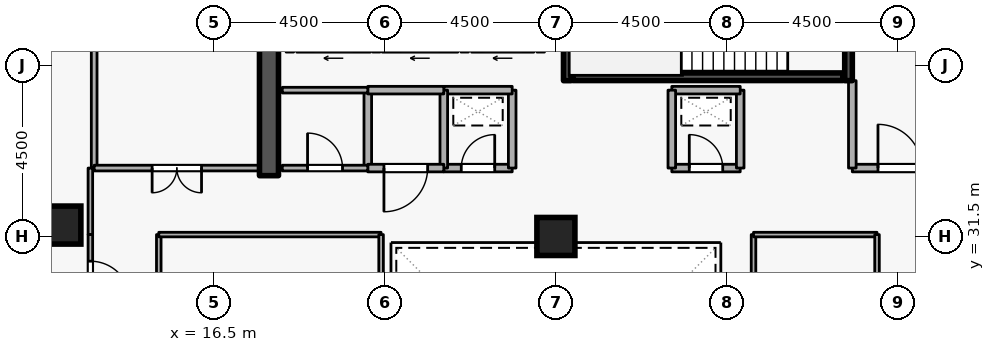
"""IFC4 building model, lengths in metres.
Left out: names, types, materials, properties, quantities, classifications, styles, units other than length and angle.
Written with IfcOpenShell. Run it as: python <this file> out.ifc"""

import sys

from ifc_helpers import new_model, si_unit, direction, frame, frame_2d, origin, origin_2d, place, context, subcontext, project, spatial, rectangle, extrude, element, fill, save


model = new_model("IFC4")
c1 = context("Model", 3, precision=1e-05, world=origin(), true_north=direction((0.0, 1.0)))
c2 = subcontext(c1, "Body", "Model", "MODEL_VIEW")
j1 = project(units=[si_unit("LENGTHUNIT", "METRE"), si_unit("PLANEANGLEUNIT", "RADIAN")], contexts=[c1])
p1 = place(None, origin())
s1 = spatial("IfcSite", under=j1, at=p1, CompositionType="ELEMENT")
p2 = place(p1, origin())
s2 = spatial("IfcBuilding", under=s1, at=p2, CompositionType="ELEMENT")
p3 = place(p2, frame((0.0, 0.0, 229.5)))
s3 = spatial("IfcBuildingStorey", under=s2, at=p3, CompositionType="ELEMENT", Elevation=229.5)
p4 = place(p3, frame((17.95, 33.1, 0.0), z_axis=(0.0, 0.0, 1.0), x_axis=(0.0, 1.0, 0.0)))
e1 = element("IfcWall", 1, at=p4, inside=s3, PredefinedType="SHEAR", context=c2, shape_type="SweptSolid", body=[
    extrude(rectangle(XDim=5.8, YDim=0.5, at=frame_2d((2.9, 0.0))), origin(), (0.0, 0.0, 1.0), 3.6),
])
for number, where, z_axis, x_axis in (
    (2, (12.5, 31.8, 0.0), (0.0, 0.0, 1.0), (1.0, 0.0, 0.0)),
    (3, (25.5, 31.5, 0.0), (0.0, 0.0, 1.0), (1.0, 0.0, 0.0)),
):
    element("IfcColumn", number, at=place(p3, frame(where, z_axis=z_axis, x_axis=x_axis)), inside=s3, PredefinedType="COLUMN", context=c2, shape_type="SweptSolid", body=[
        extrude(rectangle(XDim=1.0, YDim=1.0, at=origin_2d()), origin(), (0.0, 0.0, 1.0), 3.6),
    ])
p5 = place(p3, frame((24.92, 36.45, 0.0), z_axis=(0.0, 0.0, 1.0), x_axis=(-1.0, 0.0, 0.0)))
e4 = element("IfcWall", 4, at=p5, inside=s3, PredefinedType="STANDARD", context=c2, shape_type="SweptSolid", body=[
    extrude(rectangle(XDim=1.64, YDim=0.2, at=frame_2d((0.82, 0.0))), origin(), (0.0, 0.0, 1.0), 3.3),
])
p6 = place(p5, frame((0.31, 0.0, 0.0)))
e5 = element("IfcOpeningElement", 5, at=p6, cuts=e4, PredefinedType="OPENING", context=c2, shape_type="SweptSolid", body=[
    extrude(rectangle(XDim=1.02, YDim=2.06, at=frame_2d((0.51, 1.03))), frame((0.0, 0.11, 0.0), z_axis=(0.0, -1.0, 0.0), x_axis=(1.0, 0.0, 0.0)), (0.0, 0.0, 1.0), 0.22),
])
p7 = place(p3, frame((22.92, 36.45, 0.0), z_axis=(0.0, 0.0, 1.0), x_axis=(-1.0, 0.0, 0.0)))
e6 = element("IfcWall", 6, at=p7, inside=s3, PredefinedType="STANDARD", context=c2, shape_type="SweptSolid", body=[
    extrude(rectangle(XDim=1.99, YDim=0.2, at=frame_2d((0.995, 0.0))), origin(), (0.0, 0.0, 1.0), 3.3),
])
p8 = place(p7, frame((0.485, 0.0, 0.0)))
e7 = element("IfcOpeningElement", 7, at=p8, cuts=e6, PredefinedType="OPENING", context=c2, shape_type="SweptSolid", body=[
    extrude(rectangle(XDim=1.02, YDim=2.06, at=frame_2d((0.51, 1.03))), frame((0.0, 0.11, 0.0), z_axis=(0.0, -1.0, 0.0), x_axis=(1.0, 0.0, 0.0)), (0.0, 0.0, 1.0), 0.22),
])
p9 = place(p3, frame((20.62, 36.45, 0.0), z_axis=(0.0, 0.0, 1.0), x_axis=(-1.0, 0.0, 0.0)))
e8 = element("IfcWall", 8, at=p9, inside=s3, PredefinedType="STANDARD", context=c2, shape_type="SweptSolid", body=[
    extrude(rectangle(XDim=1.94, YDim=0.2, at=frame_2d((0.97, 0.0))), origin(), (0.0, 0.0, 1.0), 3.3),
])
p10 = place(p9, frame((0.46, 0.0, 0.0)))
e9 = element("IfcOpeningElement", 9, at=p10, cuts=e8, PredefinedType="OPENING", context=c2, shape_type="SweptSolid", body=[
    extrude(rectangle(XDim=1.02, YDim=2.06, at=frame_2d((0.51, 1.03))), frame((0.0, 0.11, 0.0), z_axis=(0.0, -1.0, 0.0), x_axis=(1.0, 0.0, 0.0)), (0.0, 0.0, 1.0), 0.22),
])
p11 = place(p3, frame((33.2, 38.95, 0.0), z_axis=(0.0, 0.0, 1.0), x_axis=(0.0, -1.0, 0.0)))
e10 = element("IfcWall", 10, at=p11, inside=s3, PredefinedType="SHEAR", context=c2, shape_type="SweptSolid", body=[
    extrude(rectangle(XDim=3.35, YDim=0.2, at=frame_2d((1.675, 0.0))), origin(), (0.0, 0.0, 1.0), 3.6),
])
p12 = place(p11, frame((1.125, 0.0, 0.0)))
e11 = element("IfcOpeningElement", 11, at=p12, cuts=e10, PredefinedType="OPENING", context=c2, shape_type="SweptSolid", body=[
    extrude(rectangle(XDim=1.1, YDim=2.1, at=frame_2d((0.55, 1.05))), frame((0.0, 0.11, 0.0), z_axis=(0.0, -1.0, 0.0), x_axis=(1.0, 0.0, 0.0)), (0.0, 0.0, 1.0), 0.22),
])
p13 = place(p3, frame((25.8, 35.6, 0.0), z_axis=(0.0, 0.0, 1.0), x_axis=(0.0, 1.0, 0.0)))
e12 = element("IfcWall", 12, at=p13, inside=s3, PredefinedType="SHEAR", context=c2, shape_type="SweptSolid", body=[
    extrude(rectangle(XDim=3.35, YDim=0.2, at=frame_2d((1.675, 0.0))), origin(), (0.0, 0.0, 1.0), 3.6),
])
p14 = place(p3, frame((25.95, 35.703, 0.0), z_axis=(0.0, 0.0, 1.0), x_axis=(1.0, 0.0, 0.0)))
e13 = element("IfcWall", 13, at=p14, inside=s3, PredefinedType="SHEAR", context=c2, shape_type="SweptSolid", body=[
    extrude(rectangle(XDim=7.1, YDim=0.2, at=frame_2d((3.55, 0.0))), origin(), (0.0, 0.0, 1.0), 3.6),
])
p15 = place(p3, frame((33.3, 33.3, 0.0), z_axis=(0.0, 0.0, 1.0), x_axis=(1.0, 0.0, 0.0)))
e14 = element("IfcWall", 14, at=p15, inside=s3, PredefinedType="STANDARD", context=c2, shape_type="SweptSolid", body=[
    extrude(rectangle(XDim=2.5, YDim=0.2, at=frame_2d((1.25, 0.0))), origin(), (0.0, 0.0, 1.0), 3.3),
])
p16 = place(p15, frame((0.675, 0.0, 0.0)))
e15 = element("IfcOpeningElement", 15, at=p16, cuts=e14, PredefinedType="OPENING", context=c2, shape_type="SweptSolid", body=[
    extrude(rectangle(XDim=1.15, YDim=2.1, at=frame_2d((0.575, 1.05))), frame((0.0, 0.11, 0.0), z_axis=(0.0, -1.0, 0.0), x_axis=(1.0, 0.0, 0.0)), (0.0, 0.0, 1.0), 0.22),
])
p17 = place(p3, frame((33.3, 35.6, 0.0), z_axis=(0.0, 0.0, 1.0), x_axis=(0.0, -1.0, 0.0)))
e16 = element("IfcWall", 16, at=p17, inside=s3, PredefinedType="STANDARD", context=c2, shape_type="SweptSolid", body=[
    extrude(rectangle(XDim=2.3, YDim=0.2, at=frame_2d((1.15, 0.0))), origin(), (0.0, 0.0, 1.0), 2.505),
])
p18 = place(p3, frame((22.55, 33.3, 0.0), z_axis=(0.0, 0.0, 1.0), x_axis=(1.0, 0.0, 0.0)))
e17 = element("IfcWall", 17, at=p18, inside=s3, PredefinedType="STANDARD", context=c2, shape_type="SweptSolid", body=[
    extrude(rectangle(XDim=1.8, YDim=0.2, at=frame_2d((0.9, 0.0))), origin(), (0.0, 0.0, 1.0), 3.3),
])
p19 = place(p18, frame((0.46, 0.0, 0.0)))
e18 = element("IfcOpeningElement", 18, at=p19, cuts=e17, PredefinedType="OPENING", context=c2, shape_type="SweptSolid", body=[
    extrude(rectangle(XDim=0.88, YDim=2.04, at=frame_2d((0.44, 1.02))), frame((0.0, 0.11, 0.0), z_axis=(0.0, -1.0, 0.0), x_axis=(1.0, 0.0, 0.0)), (0.0, 0.0, 1.0), 0.22),
])
p20 = place(p3, frame((24.35, 33.3, 0.0), z_axis=(0.0, 0.0, 1.0), x_axis=(0.0, 1.0, 0.0)))
e19 = element("IfcWall", 19, at=p20, inside=s3, PredefinedType="STANDARD", context=c2, shape_type="SweptSolid", body=[
    extrude(rectangle(XDim=2.05, YDim=0.2, at=frame_2d((1.025, 0.0))), origin(), (0.0, 0.0, 1.0), 3.3),
])
p21 = place(p3, frame((24.35, 35.35, 0.0), z_axis=(0.0, 0.0, 1.0), x_axis=(-1.0, 0.0, 0.0)))
e20 = element("IfcWall", 20, at=p21, inside=s3, PredefinedType="STANDARD", context=c2, shape_type="SweptSolid", body=[
    extrude(rectangle(XDim=1.8, YDim=0.2, at=frame_2d((0.9, 0.0))), origin(), (0.0, 0.0, 1.0), 3.3),
])
p22 = place(p3, frame((22.55, 35.35, 0.0), z_axis=(0.0, 0.0, 1.0), x_axis=(0.0, -1.0, 0.0)))
e21 = element("IfcWall", 21, at=p22, inside=s3, PredefinedType="STANDARD", context=c2, shape_type="SweptSolid", body=[
    extrude(rectangle(XDim=2.05, YDim=0.2, at=frame_2d((1.025, 0.0))), origin(), (0.0, 0.0, 1.0), 3.3),
])
p23 = place(p3, frame((28.55, 33.3, 0.0), z_axis=(0.0, 0.0, 1.0), x_axis=(1.0, 0.0, 0.0)))
e22 = element("IfcWall", 22, at=p23, inside=s3, PredefinedType="STANDARD", context=c2, shape_type="SweptSolid", body=[
    extrude(rectangle(XDim=1.8, YDim=0.2, at=frame_2d((0.9, 0.0))), origin(), (0.0, 0.0, 1.0), 3.3),
])
p24 = place(p23, frame((0.46, 0.0, 0.0)))
e23 = element("IfcOpeningElement", 23, at=p24, cuts=e22, PredefinedType="OPENING", context=c2, shape_type="SweptSolid", body=[
    extrude(rectangle(XDim=0.88, YDim=2.04, at=frame_2d((0.44, 1.02))), frame((0.0, 0.11, 0.0), z_axis=(0.0, -1.0, 0.0), x_axis=(1.0, 0.0, 0.0)), (0.0, 0.0, 1.0), 0.22),
])
p25 = place(p3, frame((30.35, 33.3, 0.0), z_axis=(0.0, 0.0, 1.0), x_axis=(0.0, 1.0, 0.0)))
e24 = element("IfcWall", 24, at=p25, inside=s3, PredefinedType="STANDARD", context=c2, shape_type="SweptSolid", body=[
    extrude(rectangle(XDim=2.05, YDim=0.2, at=frame_2d((1.025, 0.0))), origin(), (0.0, 0.0, 1.0), 3.3),
])
p26 = place(p3, frame((30.35, 35.35, 0.0), z_axis=(0.0, 0.0, 1.0), x_axis=(-1.0, 0.0, 0.0)))
e25 = element("IfcWall", 25, at=p26, inside=s3, PredefinedType="STANDARD", context=c2, shape_type="SweptSolid", body=[
    extrude(rectangle(XDim=1.8, YDim=0.2, at=frame_2d((0.9, 0.0))), origin(), (0.0, 0.0, 1.0), 3.3),
])
for number, where, z_axis, x_axis in (
    (26, (28.55, 35.35, 0.0), (0.0, 0.0, 1.0), (0.0, -1.0, 0.0)),
    (27, (20.55, 33.3, 0.0), (0.0, 0.0, 1.0), (0.0, 1.0, 0.0)),
):
    element("IfcWall", number, at=place(p3, frame(where, z_axis=z_axis, x_axis=x_axis)), inside=s3, PredefinedType="STANDARD", context=c2, shape_type="SweptSolid", body=[
        extrude(rectangle(XDim=2.05, YDim=0.2, at=frame_2d((1.025, 0.0))), origin(), (0.0, 0.0, 1.0), 3.3),
    ])
p27 = place(p3, frame((20.55, 35.35, 0.0), z_axis=(0.0, 0.0, 1.0), x_axis=(1.0, 0.0, 0.0)))
e28 = element("IfcWall", 28, at=p27, inside=s3, PredefinedType="STANDARD", context=c2, shape_type="SweptSolid", body=[
    extrude(rectangle(XDim=2.0, YDim=0.2, at=frame_2d((1.0, 0.0))), origin(), (0.0, 0.0, 1.0), 3.3),
])
p28 = place(p3, frame((22.55, 33.3, 0.0), z_axis=(0.0, 0.0, 1.0), x_axis=(-1.0, 0.0, 0.0)))
e29 = element("IfcWall", 29, at=p28, inside=s3, PredefinedType="STANDARD", context=c2, shape_type="SweptSolid", body=[
    extrude(rectangle(XDim=2.0, YDim=0.2, at=frame_2d((1.0, 0.0))), origin(), (0.0, 0.0, 1.0), 3.3),
])
p29 = place(p28, frame((0.425, 0.0, 0.0)))
e30 = element("IfcOpeningElement", 30, at=p29, cuts=e29, PredefinedType="OPENING", context=c2, shape_type="SweptSolid", body=[
    extrude(rectangle(XDim=1.15, YDim=2.1, at=frame_2d((0.575, 1.05))), frame((0.0, 0.11, 0.0), z_axis=(0.0, -1.0, 0.0), x_axis=(1.0, 0.0, 0.0)), (0.0, 0.0, 1.0), 0.22),
])
p30 = place(p3, frame((18.3, 33.3, 0.0), z_axis=(0.0, 0.0, 1.0), x_axis=(1.0, 0.0, 0.0)))
e31 = element("IfcWall", 31, at=p30, inside=s3, PredefinedType="PARTITIONING", context=c2, shape_type="SweptSolid", body=[
    extrude(rectangle(XDim=2.25, YDim=0.15, at=frame_2d((1.125, 0.0))), origin(), (0.0, 0.0, 1.0), 3.3),
])
p31 = place(p30, frame((0.665, 0.0, 0.0)))
e32 = element("IfcOpeningElement", 32, at=p31, cuts=e31, PredefinedType="OPENING", context=c2, shape_type="SweptSolid", body=[
    extrude(rectangle(XDim=0.92, YDim=2.08, at=frame_2d((0.46, 1.04))), frame((0.0, 0.085, 0.0), z_axis=(0.0, -1.0, 0.0), x_axis=(1.0, 0.0, 0.0)), (0.0, 0.0, 1.0), 0.17),
])
p32 = place(p3, frame((20.55, 35.35, 0.0), z_axis=(0.0, 0.0, 1.0), x_axis=(-1.0, 0.0, 0.0)))
e33 = element("IfcWall", 33, at=p32, inside=s3, PredefinedType="PARTITIONING", context=c2, shape_type="SweptSolid", body=[
    extrude(rectangle(XDim=2.25, YDim=0.15, at=frame_2d((1.125, 0.0))), origin(), (0.0, 0.0, 1.0), 3.3),
])
p33 = place(p3, frame((13.35, 33.3, 0.0), z_axis=(0.0, 0.0, 1.0), x_axis=(0.0, 1.0, 0.0)))
e34 = element("IfcWall", 34, at=p33, inside=s3, PredefinedType="PARTITIONING", context=c2, shape_type="SweptSolid", body=[
    extrude(rectangle(XDim=11.42, YDim=0.15, at=frame_2d((5.71, 0.0))), origin(), (0.0, 0.0, 1.0), 3.3),
])
p34 = place(p3, frame((17.7, 33.3, 0.0), z_axis=(0.0, 0.0, 1.0), x_axis=(-1.0, 0.0, 0.0)))
e35 = element("IfcWall", 35, at=p34, inside=s3, PredefinedType="PARTITIONING", context=c2, shape_type="SweptSolid", body=[
    extrude(rectangle(XDim=4.35, YDim=0.15, at=frame_2d((2.175, 0.0))), origin(), (0.0, 0.0, 1.0), 3.3),
])
p35 = place(p34, frame((1.525, 0.0, 0.0)))
e36 = element("IfcOpeningElement", 36, at=p35, cuts=e35, PredefinedType="OPENING", context=c2, shape_type="SweptSolid", body=[
    extrude(rectangle(XDim=1.3, YDim=2.12, at=frame_2d((0.65, 1.06))), frame((0.0, 0.085, 0.0), z_axis=(0.0, -1.0, 0.0), x_axis=(1.0, 0.0, 0.0)), (0.0, 0.0, 1.0), 0.17),
])
p36 = place(p3, frame((13.25, 33.3, 0.0), z_axis=(0.0, 0.0, 1.0), x_axis=(0.0, -1.0, 0.0)))
e37 = element("IfcWall", 37, at=p36, inside=s3, PredefinedType="PARTITIONING", context=c2, shape_type="SweptSolid", body=[
    extrude(rectangle(XDim=1.75, YDim=0.12, at=frame_2d((0.875, 0.0))), origin(), (0.0, 0.0, 1.0), 3.3),
])
p37 = place(p3, frame((13.25, 31.55, 0.0), z_axis=(0.0, 0.0, 1.0), x_axis=(0.0, -1.0, 0.0)))
e38 = element("IfcWall", 38, at=p37, inside=s3, PredefinedType="PARTITIONING", context=c2, shape_type="SweptSolid", body=[
    extrude(rectangle(XDim=2.45, YDim=0.12, at=frame_2d((1.225, 0.0))), origin(), (0.0, 0.0, 1.0), 3.3),
])
p38 = place(p37, frame((0.7, 0.0, 0.0)))
e39 = element("IfcOpeningElement", 39, at=p38, cuts=e38, PredefinedType="OPENING", context=c2, shape_type="SweptSolid", body=[
    extrude(rectangle(XDim=1.05, YDim=2.1, at=frame_2d((0.525, 1.05))), frame((0.0, 0.07, 0.0), z_axis=(0.0, -1.0, 0.0), x_axis=(1.0, 0.0, 0.0)), (0.0, 0.0, 1.0), 0.14),
])
p39 = place(p3, frame((15.05, 22.45, 0.0), z_axis=(0.0, 0.0, 1.0), x_axis=(0.0, 1.0, 0.0)))
e40 = element("IfcWall", 40, at=p39, inside=s3, PredefinedType="PARTITIONING", context=c2, shape_type="SweptSolid", body=[
    extrude(rectangle(XDim=9.1, YDim=0.12, at=frame_2d((4.55, 0.0))), origin(), (0.0, 0.0, 1.0), 3.3),
])
p40 = place(p39, frame((4.075, 0.0, 0.0)))
e41 = element("IfcOpeningElement", 41, at=p40, cuts=e40, PredefinedType="OPENING", context=c2, shape_type="SweptSolid", body=[
    extrude(rectangle(XDim=0.95, YDim=2.1, at=frame_2d((0.475, 1.05))), frame((0.0, 0.07, 0.0), z_axis=(0.0, -1.0, 0.0), x_axis=(1.0, 0.0, 0.0)), (0.0, 0.0, 1.0), 0.14),
])
p41 = place(p3, frame((15.05, 31.55, 0.0), z_axis=(0.0, 0.0, 1.0), x_axis=(1.0, 0.0, 0.0)))
e42 = element("IfcWall", 42, at=p41, inside=s3, PredefinedType="PARTITIONING", context=c2, shape_type="SweptSolid", body=[
    extrude(rectangle(XDim=5.85, YDim=0.12, at=frame_2d((2.925, 0.0))), origin(), (0.0, 0.0, 1.0), 3.3),
])
for number, where, z_axis, x_axis in (
    (43, (20.9, 31.55, 0.0), (0.0, 0.0, 1.0), (0.0, -1.0, 0.0)),
    (44, (30.7, 22.45, 0.0), (0.0, 0.0, 1.0), (0.0, 1.0, 0.0)),
):
    element("IfcWall", number, at=place(p3, frame(where, z_axis=z_axis, x_axis=x_axis)), inside=s3, PredefinedType="PARTITIONING", context=c2, shape_type="SweptSolid", body=[
        extrude(rectangle(XDim=9.1, YDim=0.12, at=frame_2d((4.55, 0.0))), origin(), (0.0, 0.0, 1.0), 3.3),
    ])
p42 = place(p3, frame((30.7, 31.55, 0.0), z_axis=(0.0, 0.0, 1.0), x_axis=(1.0, 0.0, 0.0)))
e45 = element("IfcWall", 45, at=p42, inside=s3, PredefinedType="PARTITIONING", context=c2, shape_type="SweptSolid", body=[
    extrude(rectangle(XDim=3.25, YDim=0.12, at=frame_2d((1.625, 0.0))), origin(), (0.0, 0.0, 1.0), 3.3),
])
p43 = place(p3, frame((33.95, 31.55, 0.0), z_axis=(0.0, 0.0, 1.0), x_axis=(0.0, -1.0, 0.0)))
e46 = element("IfcWall", 46, at=p43, inside=s3, PredefinedType="PARTITIONING", context=c2, shape_type="SweptSolid", body=[
    extrude(rectangle(XDim=9.1, YDim=0.12, at=frame_2d((4.55, 0.0))), origin(), (0.0, 0.0, 1.0), 3.3),
])
p44 = place(p43, frame((4.075, 0.0, 0.0)))
e47 = element("IfcOpeningElement", 47, at=p44, cuts=e46, PredefinedType="OPENING", context=c2, shape_type="SweptSolid", body=[
    extrude(rectangle(XDim=0.95, YDim=2.1, at=frame_2d((0.475, 1.05))), frame((0.0, 0.07, 0.0), z_axis=(0.0, -1.0, 0.0), x_axis=(1.0, 0.0, 0.0)), (0.0, 0.0, 1.0), 0.14),
])
p45 = place(p16, origin())
e48 = element("IfcDoor", 48, at=p45, inside=s3, OperationType="SINGLE_SWING_LEFT", PredefinedType="DOOR", context=c2, shape_type="SweptSolid", body=[
    extrude(rectangle(XDim=1.15, YDim=2.1, at=frame_2d((0.575, 1.05))), frame((0.0, 0.025, 0.0), z_axis=(0.0, -1.0, 0.0), x_axis=(1.0, 0.0, 0.0)), (0.0, 0.0, 1.0), 0.05),
])
fill(e15, e48)
p46 = place(p19, origin())
e49 = element("IfcDoor", 49, at=p46, inside=s3, OperationType="SINGLE_SWING_RIGHT", PredefinedType="DOOR", context=c2, shape_type="SweptSolid", body=[
    extrude(rectangle(XDim=0.88, YDim=2.04, at=frame_2d((0.44, 1.02))), frame((0.0, 0.025, 0.0), z_axis=(0.0, -1.0, 0.0), x_axis=(1.0, 0.0, 0.0)), (0.0, 0.0, 1.0), 0.05),
])
fill(e18, e49)
p47 = place(p24, origin())
e50 = element("IfcDoor", 50, at=p47, inside=s3, OperationType="SINGLE_SWING_LEFT", PredefinedType="DOOR", context=c2, shape_type="SweptSolid", body=[
    extrude(rectangle(XDim=0.88, YDim=2.04, at=frame_2d((0.44, 1.02))), frame((0.0, 0.025, 0.0), z_axis=(0.0, -1.0, 0.0), x_axis=(1.0, 0.0, 0.0)), (0.0, 0.0, 1.0), 0.05),
])
fill(e23, e50)
p48 = place(p31, origin())
e51 = element("IfcDoor", 51, at=p48, inside=s3, OperationType="SINGLE_SWING_LEFT", PredefinedType="DOOR", context=c2, shape_type="SweptSolid", body=[
    extrude(rectangle(XDim=0.92, YDim=2.08, at=frame_2d((0.46, 1.04))), frame((0.0, 0.025, 0.0), z_axis=(0.0, -1.0, 0.0), x_axis=(1.0, 0.0, 0.0)), (0.0, 0.0, 1.0), 0.05),
])
fill(e32, e51)
p49 = place(p29, origin())
e52 = element("IfcDoor", 52, at=p49, inside=s3, OperationType="SINGLE_SWING_RIGHT", PredefinedType="DOOR", context=c2, shape_type="SweptSolid", body=[
    extrude(rectangle(XDim=1.15, YDim=2.1, at=frame_2d((0.575, 1.05))), frame((0.0, 0.025, 0.0), z_axis=(0.0, -1.0, 0.0), x_axis=(1.0, 0.0, 0.0)), (0.0, 0.0, 1.0), 0.05),
])
fill(e30, e52)
p50 = place(p35, origin())
e53 = element("IfcDoor", 53, at=p50, inside=s3, OperationType="DOUBLE_DOOR_SINGLE_SWING", PredefinedType="DOOR", context=c2, shape_type="SweptSolid", body=[
    extrude(rectangle(XDim=1.3, YDim=2.12, at=frame_2d((0.65, 1.06))), frame((0.0, 0.025, 0.0), z_axis=(0.0, -1.0, 0.0), x_axis=(1.0, 0.0, 0.0)), (0.0, 0.0, 1.0), 0.05),
])
fill(e36, e53)
p51 = place(p38, origin())
e54 = element("IfcDoor", 54, at=p51, inside=s3, OperationType="SINGLE_SWING_RIGHT", PredefinedType="DOOR", context=c2, shape_type="SweptSolid", body=[
    extrude(rectangle(XDim=1.05, YDim=2.1, at=frame_2d((0.525, 1.05))), frame((0.0, 0.025, 0.0), z_axis=(0.0, -1.0, 0.0), x_axis=(1.0, 0.0, 0.0)), (0.0, 0.0, 1.0), 0.05),
])
fill(e39, e54)
save(model, sys.argv[1])
